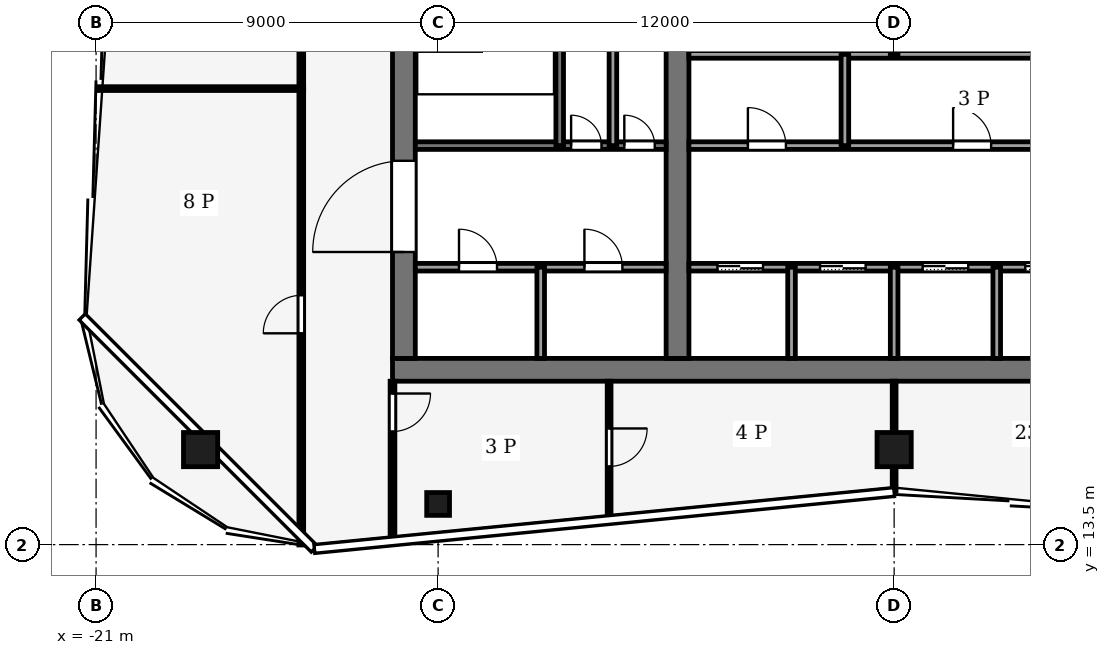
"""IFC4 building model, lengths in metres.
Left out: names, types, materials, properties, quantities, classifications, styles, units other than length and angle.
Written with IfcOpenShell. Run it as: python <this file> out.ifc"""

import sys

from ifc_helpers import new_model, si_unit, direction, frame, frame_2d, origin, origin_2d, place, context, subcontext, project, spatial, rectangle, hollow_rectangle, extrude, element, fill, save


model = new_model("IFC4")
c1 = context("Model", 3, precision=1e-05, world=origin(), true_north=direction((0.0, 1.0)))
c2 = subcontext(c1, "Body", "Model", "MODEL_VIEW")
j1 = project(units=[si_unit("LENGTHUNIT", "METRE"), si_unit("PLANEANGLEUNIT", "RADIAN")], contexts=[c1])
p1 = place(None, origin())
s1 = spatial("IfcSite", under=j1, at=p1, CompositionType="ELEMENT")
p2 = place(p1, origin())
s2 = spatial("IfcBuilding", under=s1, at=p2, CompositionType="ELEMENT")
p3 = place(p2, frame((0.0, 0.0, 314.0)))
s3 = spatial("IfcBuildingStorey", under=s2, at=p3, CompositionType="ELEMENT", Elevation=314.0)
p4 = place(p3, frame((-13.2, 18.1, -0.13), z_axis=(0.0, 0.0, 1.0), x_axis=(1.0, 0.0, 0.0)))
e1 = element("IfcWall", 1, at=p4, inside=s3, PredefinedType="SHEAR", context=c2, shape_type="SweptSolid", body=[
    extrude(rectangle(XDim=26.4, YDim=0.6, at=frame_2d((13.2, 0.0))), origin(), (0.0, 0.0, 1.0), 4.0),
])
p5 = place(p3, frame((-12.9, 18.4, -0.13), z_axis=(0.0, 0.0, 1.0), x_axis=(0.0, 1.0, 0.0)))
e2 = element("IfcWall", 2, at=p5, inside=s3, PredefinedType="SHEAR", context=c2, shape_type="SweptSolid", body=[
    extrude(rectangle(XDim=19.2, YDim=0.6, at=frame_2d((9.6, 0.0))), origin(), (0.0, 0.0, 1.0), 4.0),
])
p6 = place(p5, frame((2.8, 0.0, 0.13)))
e3 = element("IfcOpeningElement", 3, at=p6, cuts=e2, PredefinedType="OPENING", context=c2, shape_type="SweptSolid", body=[
    extrude(rectangle(XDim=2.4, YDim=2.4, at=frame_2d((1.2, 1.2))), frame((0.0, 0.31, 0.0), z_axis=(0.0, -1.0, 0.0), x_axis=(1.0, 0.0, 0.0)), (0.0, 0.0, 1.0), 0.62),
])
p7 = place(p5, frame((13.4, 0.0, 0.13)))
e4 = element("IfcOpeningElement", 4, at=p7, cuts=e2, PredefinedType="OPENING", context=c2, shape_type="SweptSolid", body=[
    extrude(rectangle(XDim=1.4, YDim=2.2, at=frame_2d((0.7, 1.1))), frame((0.0, 0.31, 0.0), z_axis=(0.0, -1.0, 0.0), x_axis=(1.0, 0.0, 0.0)), (0.0, 0.0, 1.0), 0.62),
])
p8 = place(p3, frame((-5.7, 18.4, -0.13), z_axis=(0.0, 0.0, 1.0), x_axis=(0.0, 1.0, 0.0)))
e5 = element("IfcWall", 5, at=p8, inside=s3, PredefinedType="SHEAR", context=c2, shape_type="SweptSolid", body=[
    extrude(rectangle(XDim=19.2, YDim=0.6, at=frame_2d((9.6, 0.0))), origin(), (0.0, 0.0, 1.0), 4.0),
])
p9 = place(p8, frame((8.35, 0.0, 0.13)))
e6 = element("IfcOpeningElement", 6, at=p9, cuts=e5, PredefinedType="OPENING", context=c2, shape_type="SweptSolid", body=[
    extrude(rectangle(XDim=0.9, YDim=2.1, at=frame_2d((0.45, 1.05))), frame((0.0, 0.31, 0.0), z_axis=(0.0, -1.0, 0.0), x_axis=(1.0, 0.0, 0.0)), (0.0, 0.0, 1.0), 0.62),
])
for number, where, z_axis, x_axis in (
    (7, (0.0, 16.0, 0.0), (0.0, 0.0, 1.0), (1.0, 0.0, 0.0)),
    (8, (-18.25, 16.0, 0.0), (0.0, 0.0, 1.0), (1.0, 0.0, 0.0)),
):
    element("IfcColumn", number, at=place(p3, frame(where, z_axis=z_axis, x_axis=x_axis)), inside=s3, PredefinedType="COLUMN", context=c2, shape_type="SweptSolid", body=[
        extrude(hollow_rectangle(XDim=0.9, YDim=0.9, WallThickness=0.04, at=origin_2d()), origin(), (0.0, 0.0, 1.0), 4.0),
    ])
p10 = place(p3, frame((-12.0, 14.57, 0.0), z_axis=(0.0, 0.0, 1.0), x_axis=(1.0, 0.0, 0.0)))
e9 = element("IfcColumn", 9, at=p10, inside=s3, PredefinedType="COLUMN", context=c2, shape_type="SweptSolid", body=[
    extrude(hollow_rectangle(XDim=0.6, YDim=0.6, WallThickness=0.025, at=origin_2d()), origin(), (0.0, 0.0, 1.0), 4.0),
])
p11 = place(p3, frame((-12.6, 20.8, 0.0), z_axis=(0.0, 0.0, 1.0), x_axis=(1.0, 0.0, 0.0)))
e10 = element("IfcWall", 10, at=p11, inside=s3, PredefinedType="PARTITIONING", context=c2, shape_type="SweptSolid", body=[
    extrude(rectangle(XDim=6.6, YDim=0.2, at=frame_2d((3.3, 0.0))), origin(), (0.0, 0.0, 1.0), 3.87),
])
p12 = place(p11, frame((1.15, 0.0, 0.0)))
e11 = element("IfcOpeningElement", 11, at=p12, cuts=e10, PredefinedType="OPENING", context=c2, shape_type="SweptSolid", body=[
    extrude(rectangle(XDim=1.0, YDim=2.1, at=frame_2d((0.5, 1.05))), frame((0.0, 0.11, 0.0), z_axis=(0.0, -1.0, 0.0), x_axis=(1.0, 0.0, 0.0)), (0.0, 0.0, 1.0), 0.22),
])
p13 = place(p11, frame((4.45, 0.0, 0.0)))
e12 = element("IfcOpeningElement", 12, at=p13, cuts=e10, PredefinedType="OPENING", context=c2, shape_type="SweptSolid", body=[
    extrude(rectangle(XDim=1.0, YDim=2.1, at=frame_2d((0.5, 1.05))), frame((0.0, 0.11, 0.0), z_axis=(0.0, -1.0, 0.0), x_axis=(1.0, 0.0, 0.0)), (0.0, 0.0, 1.0), 0.22),
])
p14 = place(p3, frame((-5.4, 20.8, 0.0), z_axis=(0.0, 0.0, 1.0), x_axis=(1.0, 0.0, 0.0)))
e13 = element("IfcWall", 13, at=p14, inside=s3, PredefinedType="PARTITIONING", context=c2, shape_type="SweptSolid", body=[
    extrude(rectangle(XDim=10.8, YDim=0.2, at=frame_2d((5.4, 0.0))), origin(), (0.0, 0.0, 1.0), 3.87),
])
p15 = place(p14, frame((0.75, 0.0, 0.0)))
e14 = element("IfcOpeningElement", 14, at=p15, cuts=e13, PredefinedType="OPENING", context=c2, shape_type="SweptSolid", body=[
    extrude(rectangle(XDim=1.2, YDim=2.2, at=frame_2d((0.6, 1.1))), frame((0.0, 0.11, 0.0), z_axis=(0.0, -1.0, 0.0), x_axis=(1.0, 0.0, 0.0)), (0.0, 0.0, 1.0), 0.22),
])
p16 = place(p14, frame((3.45, 0.0, 0.0)))
e15 = element("IfcOpeningElement", 15, at=p16, cuts=e13, PredefinedType="OPENING", context=c2, shape_type="SweptSolid", body=[
    extrude(rectangle(XDim=1.2, YDim=2.2, at=frame_2d((0.6, 1.1))), frame((0.0, 0.11, 0.0), z_axis=(0.0, -1.0, 0.0), x_axis=(1.0, 0.0, 0.0)), (0.0, 0.0, 1.0), 0.22),
])
p17 = place(p14, frame((6.15, 0.0, 0.0)))
e16 = element("IfcOpeningElement", 16, at=p17, cuts=e13, PredefinedType="OPENING", context=c2, shape_type="SweptSolid", body=[
    extrude(rectangle(XDim=1.2, YDim=2.2, at=frame_2d((0.6, 1.1))), frame((0.0, 0.11, 0.0), z_axis=(0.0, -1.0, 0.0), x_axis=(1.0, 0.0, 0.0)), (0.0, 0.0, 1.0), 0.22),
])
p18 = place(p14, frame((8.85, 0.0, 0.0)))
e17 = element("IfcOpeningElement", 17, at=p18, cuts=e13, PredefinedType="OPENING", context=c2, shape_type="SweptSolid", body=[
    extrude(rectangle(XDim=1.2, YDim=2.2, at=frame_2d((0.6, 1.1))), frame((0.0, 0.11, 0.0), z_axis=(0.0, -1.0, 0.0), x_axis=(1.0, 0.0, 0.0)), (0.0, 0.0, 1.0), 0.22),
])
p19 = place(p3, frame((-12.6, 24.0, 0.0), z_axis=(0.0, 0.0, 1.0), x_axis=(1.0, 0.0, 0.0)))
e18 = element("IfcWall", 18, at=p19, inside=s3, PredefinedType="PARTITIONING", context=c2, shape_type="SweptSolid", body=[
    extrude(rectangle(XDim=6.6, YDim=0.2, at=frame_2d((3.3, 0.0))), origin(), (0.0, 0.0, 1.0), 3.87),
])
p20 = place(p19, frame((4.1, 0.0, 0.0)))
e19 = element("IfcOpeningElement", 19, at=p20, cuts=e18, PredefinedType="OPENING", context=c2, shape_type="SweptSolid", body=[
    extrude(rectangle(XDim=0.8, YDim=2.1, at=frame_2d((0.4, 1.05))), frame((0.0, 0.11, 0.0), z_axis=(0.0, -1.0, 0.0), x_axis=(1.0, 0.0, 0.0)), (0.0, 0.0, 1.0), 0.22),
])
p21 = place(p19, frame((5.5, 0.0, 0.0)))
e20 = element("IfcOpeningElement", 20, at=p21, cuts=e18, PredefinedType="OPENING", context=c2, shape_type="SweptSolid", body=[
    extrude(rectangle(XDim=0.8, YDim=2.1, at=frame_2d((0.4, 1.05))), frame((0.0, 0.11, 0.0), z_axis=(0.0, -1.0, 0.0), x_axis=(1.0, 0.0, 0.0)), (0.0, 0.0, 1.0), 0.22),
])
p22 = place(p3, frame((-5.4, 24.0, 0.0), z_axis=(0.0, 0.0, 1.0), x_axis=(1.0, 0.0, 0.0)))
e21 = element("IfcWall", 21, at=p22, inside=s3, PredefinedType="PARTITIONING", context=c2, shape_type="SweptSolid", body=[
    extrude(rectangle(XDim=10.8, YDim=0.2, at=frame_2d((5.4, 0.0))), origin(), (0.0, 0.0, 1.0), 3.87),
])
p23 = place(p22, frame((1.552, 0.0, 0.0)))
e22 = element("IfcOpeningElement", 22, at=p23, cuts=e21, PredefinedType="OPENING", context=c2, shape_type="SweptSolid", body=[
    extrude(rectangle(XDim=1.0, YDim=2.1, at=frame_2d((0.5, 1.05))), frame((0.0, 0.11, 0.0), z_axis=(0.0, -1.0, 0.0), x_axis=(1.0, 0.0, 0.0)), (0.0, 0.0, 1.0), 0.22),
])
p24 = place(p22, frame((6.952, 0.0, 0.0)))
e23 = element("IfcOpeningElement", 23, at=p24, cuts=e21, PredefinedType="OPENING", context=c2, shape_type="SweptSolid", body=[
    extrude(rectangle(XDim=1.0, YDim=2.1, at=frame_2d((0.5, 1.05))), frame((0.0, 0.11, 0.0), z_axis=(0.0, -1.0, 0.0), x_axis=(1.0, 0.0, 0.0)), (0.0, 0.0, 1.0), 0.22),
])
p25 = place(p3, frame((-5.4, 26.4, 0.0), z_axis=(0.0, 0.0, 1.0), x_axis=(1.0, 0.0, 0.0)))
e24 = element("IfcWall", 24, at=p25, inside=s3, PredefinedType="PARTITIONING", context=c2, shape_type="SweptSolid", body=[
    extrude(rectangle(XDim=10.8, YDim=0.2, at=frame_2d((5.4, 0.0))), origin(), (0.0, 0.0, 1.0), 3.87),
])
p26 = place(p3, frame((-9.3, 18.4, 0.0), z_axis=(0.0, 0.0, 1.0), x_axis=(0.0, 1.0, 0.0)))
e25 = element("IfcWall", 25, at=p26, inside=s3, PredefinedType="PARTITIONING", context=c2, shape_type="SweptSolid", body=[
    extrude(rectangle(XDim=2.4, YDim=0.2, at=frame_2d((1.2, 0.0))), origin(), (0.0, 0.0, 1.0), 3.87),
])
for number, where, z_axis, x_axis in (
    (26, (-8.8, 24.0, 0.0), (0.0, 0.0, 1.0), (0.0, 1.0, 0.0)),
    (27, (-7.4, 24.0, 0.0), (0.0, 0.0, 1.0), (0.0, 1.0, 0.0)),
):
    element("IfcWall", number, at=place(p3, frame(where, z_axis=z_axis, x_axis=x_axis)), inside=s3, PredefinedType="PARTITIONING", context=c2, shape_type="SweptSolid", body=[
        extrude(rectangle(XDim=7.4, YDim=0.2, at=frame_2d((3.7, 0.0))), origin(), (0.0, 0.0, 1.0), 3.87),
    ])
p27 = place(p3, frame((-2.7, 18.4, 0.0), z_axis=(0.0, 0.0, 1.0), x_axis=(0.0, 1.0, 0.0)))
e28 = element("IfcWall", 28, at=p27, inside=s3, PredefinedType="PARTITIONING", context=c2, shape_type="SweptSolid", body=[
    extrude(rectangle(XDim=2.4, YDim=0.2, at=frame_2d((1.2, 0.0))), origin(), (0.0, 0.0, 1.0), 3.87),
])
p28 = place(p3, frame((-1.296, 24.0, 0.0), z_axis=(0.0, 0.0, 1.0), x_axis=(0.0, 1.0, 0.0)))
e29 = element("IfcWall", 29, at=p28, inside=s3, PredefinedType="PARTITIONING", context=c2, shape_type="SweptSolid", body=[
    extrude(rectangle(XDim=2.4, YDim=0.2, at=frame_2d((1.2, 0.0))), origin(), (0.0, 0.0, 1.0), 3.87),
])
p29 = place(p3, frame((0.0, 18.4, 0.0), z_axis=(0.0, 0.0, 1.0), x_axis=(0.0, 1.0, 0.0)))
e30 = element("IfcWall", 30, at=p29, inside=s3, PredefinedType="PARTITIONING", context=c2, shape_type="SweptSolid", body=[
    extrude(rectangle(XDim=2.4, YDim=0.2, at=frame_2d((1.2, 0.0))), origin(), (0.0, 0.0, 1.0), 3.87),
])
p30 = place(p3, frame((0.0, 26.4, 0.0), z_axis=(0.0, 0.0, 1.0), x_axis=(0.0, 1.0, 0.0)))
e31 = element("IfcWall", 31, at=p30, inside=s3, PredefinedType="PARTITIONING", context=c2, shape_type="SweptSolid", body=[
    extrude(rectangle(XDim=1.6, YDim=0.2, at=frame_2d((0.8, 0.0))), origin(), (0.0, 0.0, 1.0), 3.87),
])
p31 = place(p3, frame((2.7, 18.4, 0.0), z_axis=(0.0, 0.0, 1.0), x_axis=(0.0, 1.0, 0.0)))
e32 = element("IfcWall", 32, at=p31, inside=s3, PredefinedType="PARTITIONING", context=c2, shape_type="SweptSolid", body=[
    extrude(rectangle(XDim=2.4, YDim=0.2, at=frame_2d((1.2, 0.0))), origin(), (0.0, 0.0, 1.0), 3.87),
])
p32 = place(p3, frame((-15.6, 13.49, 0.0), z_axis=(0.0, 0.0, 1.0), x_axis=(0.0, 1.0, 0.0)))
e33 = element("IfcWall", 33, at=p32, inside=s3, PredefinedType="PARTITIONING", context=c2, shape_type="SweptSolid", body=[
    extrude(rectangle(XDim=12.01, YDim=0.125, at=frame_2d((6.005, 0.0))), origin(), (0.0, 0.0, 1.0), 2.93),
])
p33 = place(p32, frame((5.571, 0.0, 0.0)))
e34 = element("IfcOpeningElement", 34, at=p33, cuts=e33, PredefinedType="OPENING", context=c2, shape_type="SweptSolid", body=[
    extrude(rectangle(XDim=1.0, YDim=2.1, at=frame_2d((0.5, 1.05))), frame((0.0, 0.073, 0.0), z_axis=(0.0, -1.0, 0.0), x_axis=(1.0, 0.0, 0.0)), (0.0, 0.0, 1.0), 0.145),
])
p34 = place(p3, frame((-15.6, 25.5, 0.0), z_axis=(0.0, 0.0, 1.0), x_axis=(0.0, 1.0, 0.0)))
e35 = element("IfcWall", 35, at=p34, inside=s3, PredefinedType="PARTITIONING", context=c2, shape_type="SweptSolid", body=[
    extrude(rectangle(XDim=9.0, YDim=0.125, at=frame_2d((4.5, 0.0))), origin(), (0.0, 0.0, 1.0), 3.54),
])
p35 = place(p34, frame((4.0, 0.0, 0.0)))
e36 = element("IfcOpeningElement", 36, at=p35, cuts=e35, PredefinedType="OPENING", context=c2, shape_type="SweptSolid", body=[
    extrude(rectangle(XDim=1.0, YDim=2.1, at=frame_2d((0.5, 1.05))), frame((0.0, 0.073, 0.0), z_axis=(0.0, -1.0, 0.0), x_axis=(1.0, 0.0, 0.0)), (0.0, 0.0, 1.0), 0.145),
])
p36 = place(p3, frame((-13.2, 17.8, 0.0), z_axis=(0.0, 0.0, 1.0), x_axis=(0.0, -1.0, 0.0)))
e37 = element("IfcWall", 37, at=p36, inside=s3, PredefinedType="PARTITIONING", context=c2, shape_type="SweptSolid", body=[
    extrude(rectangle(XDim=4.178, YDim=0.125, at=frame_2d((2.089, 0.0))), origin(), (0.0, 0.0, 1.0), 3.04),
])
p37 = place(p36, frame((0.324, 0.0, 0.0)))
e38 = element("IfcOpeningElement", 38, at=p37, cuts=e37, PredefinedType="OPENING", context=c2, shape_type="SweptSolid", body=[
    extrude(rectangle(XDim=1.0, YDim=2.1, at=frame_2d((0.5, 1.05))), frame((0.0, 0.073, 0.0), z_axis=(0.0, -1.0, 0.0), x_axis=(1.0, 0.0, 0.0)), (0.0, 0.0, 1.0), 0.145),
])
p38 = place(p3, frame((-15.6, 25.5, 0.0), z_axis=(0.0, 0.0, 1.0), x_axis=(-1.0, 0.0, 0.0)))
e39 = element("IfcWall", 39, at=p38, inside=s3, PredefinedType="PARTITIONING", context=c2, shape_type="SweptSolid", body=[
    extrude(rectangle(XDim=5.316, YDim=0.1, at=frame_2d((2.658, 0.0))), origin(), (0.0, 0.0, 1.0), 3.04),
])
p39 = place(p3, frame((-7.5, 17.8, 0.0), z_axis=(0.0, 0.0, 1.0), x_axis=(0.0, -1.0, 0.0)))
e40 = element("IfcWall", 40, at=p39, inside=s3, PredefinedType="PARTITIONING", context=c2, shape_type="SweptSolid", body=[
    extrude(rectangle(XDim=3.618, YDim=0.1, at=frame_2d((1.809, 0.0))), origin(), (0.0, 0.0, 1.0), 3.04),
])
p40 = place(p39, frame((1.244, 0.0, 0.0)))
e41 = element("IfcOpeningElement", 41, at=p40, cuts=e40, PredefinedType="OPENING", context=c2, shape_type="SweptSolid", body=[
    extrude(rectangle(XDim=1.0, YDim=2.1, at=frame_2d((0.5, 1.05))), frame((0.0, 0.06, 0.0), z_axis=(0.0, -1.0, 0.0), x_axis=(1.0, 0.0, 0.0)), (0.0, 0.0, 1.0), 0.12),
])
p41 = place(p3, frame((0.0, 14.92, 0.0), z_axis=(0.0, 0.0, 1.0), x_axis=(0.0, 1.0, 0.0)))
e42 = element("IfcWall", 42, at=p41, inside=s3, PredefinedType="PARTITIONING", context=c2, shape_type="SweptSolid", body=[
    extrude(rectangle(XDim=2.88, YDim=0.1, at=frame_2d((1.44, 0.0))), origin(), (0.0, 0.0, 1.0), 3.54),
])
p42 = place(p15, origin())
e43 = element("IfcDoor", 43, at=p42, inside=s3, OperationType="SLIDING_TO_LEFT", PredefinedType="DOOR", context=c2, shape_type="SweptSolid", body=[
    extrude(rectangle(XDim=1.2, YDim=2.2, at=frame_2d((0.6, 1.1))), frame((0.0, 0.025, 0.0), z_axis=(0.0, -1.0, 0.0), x_axis=(1.0, 0.0, 0.0)), (0.0, 0.0, 1.0), 0.05),
])
fill(e14, e43)
p43 = place(p16, origin())
e44 = element("IfcDoor", 44, at=p43, inside=s3, OperationType="SLIDING_TO_LEFT", PredefinedType="DOOR", context=c2, shape_type="SweptSolid", body=[
    extrude(rectangle(XDim=1.2, YDim=2.2, at=frame_2d((0.6, 1.1))), frame((0.0, 0.025, 0.0), z_axis=(0.0, -1.0, 0.0), x_axis=(1.0, 0.0, 0.0)), (0.0, 0.0, 1.0), 0.05),
])
fill(e15, e44)
p44 = place(p17, origin())
e45 = element("IfcDoor", 45, at=p44, inside=s3, OperationType="SLIDING_TO_LEFT", PredefinedType="DOOR", context=c2, shape_type="SweptSolid", body=[
    extrude(rectangle(XDim=1.2, YDim=2.2, at=frame_2d((0.6, 1.1))), frame((0.0, 0.025, 0.0), z_axis=(0.0, -1.0, 0.0), x_axis=(1.0, 0.0, 0.0)), (0.0, 0.0, 1.0), 0.05),
])
fill(e16, e45)
p45 = place(p18, origin())
e46 = element("IfcDoor", 46, at=p45, inside=s3, OperationType="SLIDING_TO_LEFT", PredefinedType="DOOR", context=c2, shape_type="SweptSolid", body=[
    extrude(rectangle(XDim=1.2, YDim=2.2, at=frame_2d((0.6, 1.1))), frame((0.0, 0.025, 0.0), z_axis=(0.0, -1.0, 0.0), x_axis=(1.0, 0.0, 0.0)), (0.0, 0.0, 1.0), 0.05),
])
fill(e17, e46)
p46 = place(p23, origin())
e47 = element("IfcDoor", 47, at=p46, inside=s3, OperationType="SINGLE_SWING_LEFT", PredefinedType="DOOR", context=c2, shape_type="SweptSolid", body=[
    extrude(rectangle(XDim=1.0, YDim=2.1, at=frame_2d((0.5, 1.05))), frame((0.0, 0.025, 0.0), z_axis=(0.0, -1.0, 0.0), x_axis=(1.0, 0.0, 0.0)), (0.0, 0.0, 1.0), 0.05),
])
fill(e22, e47)
p47 = place(p24, origin())
e48 = element("IfcDoor", 48, at=p47, inside=s3, OperationType="SINGLE_SWING_RIGHT", PredefinedType="DOOR", context=c2, shape_type="SweptSolid", body=[
    extrude(rectangle(XDim=1.0, YDim=2.1, at=frame_2d((0.5, 1.05))), frame((0.0, 0.025, 0.0), z_axis=(0.0, -1.0, 0.0), x_axis=(1.0, 0.0, 0.0)), (0.0, 0.0, 1.0), 0.05),
])
fill(e23, e48)
p48 = place(p12, origin())
e49 = element("IfcDoor", 49, at=p48, inside=s3, OperationType="SINGLE_SWING_LEFT", PredefinedType="DOOR", context=c2, shape_type="SweptSolid", body=[
    extrude(rectangle(XDim=1.0, YDim=2.1, at=frame_2d((0.5, 1.05))), frame((0.0, 0.025, 0.0), z_axis=(0.0, -1.0, 0.0), x_axis=(1.0, 0.0, 0.0)), (0.0, 0.0, 1.0), 0.05),
])
fill(e11, e49)
p49 = place(p13, origin())
e50 = element("IfcDoor", 50, at=p49, inside=s3, OperationType="SINGLE_SWING_LEFT", PredefinedType="DOOR", context=c2, shape_type="SweptSolid", body=[
    extrude(rectangle(XDim=1.0, YDim=2.1, at=frame_2d((0.5, 1.05))), frame((0.0, 0.025, 0.0), z_axis=(0.0, -1.0, 0.0), x_axis=(1.0, 0.0, 0.0)), (0.0, 0.0, 1.0), 0.05),
])
fill(e12, e50)
p50 = place(p20, origin())
e51 = element("IfcDoor", 51, at=p50, inside=s3, OperationType="SINGLE_SWING_LEFT", PredefinedType="DOOR", context=c2, shape_type="SweptSolid", body=[
    extrude(rectangle(XDim=0.8, YDim=2.1, at=frame_2d((0.4, 1.05))), frame((0.0, 0.025, 0.0), z_axis=(0.0, -1.0, 0.0), x_axis=(1.0, 0.0, 0.0)), (0.0, 0.0, 1.0), 0.05),
])
fill(e19, e51)
p51 = place(p21, origin())
e52 = element("IfcDoor", 52, at=p51, inside=s3, OperationType="SINGLE_SWING_RIGHT", PredefinedType="DOOR", context=c2, shape_type="SweptSolid", body=[
    extrude(rectangle(XDim=0.8, YDim=2.1, at=frame_2d((0.4, 1.05))), frame((0.0, 0.025, 0.0), z_axis=(0.0, -1.0, 0.0), x_axis=(1.0, 0.0, 0.0)), (0.0, 0.0, 1.0), 0.05),
])
fill(e20, e52)
p52 = place(p6, origin())
e53 = element("IfcDoor", 53, at=p52, inside=s3, OperationType="DOUBLE_DOOR_SINGLE_SWING", PredefinedType="DOOR", context=c2, shape_type="SweptSolid", body=[
    extrude(rectangle(XDim=2.4, YDim=2.4, at=frame_2d((1.2, 1.2))), frame((0.0, 0.025, 0.0), z_axis=(0.0, -1.0, 0.0), x_axis=(1.0, 0.0, 0.0)), (0.0, 0.0, 1.0), 0.05),
])
fill(e3, e53)
p53 = place(p33, origin())
e54 = element("IfcDoor", 54, at=p53, inside=s3, OperationType="SINGLE_SWING_RIGHT", PredefinedType="DOOR", context=c2, shape_type="SweptSolid", body=[
    extrude(rectangle(XDim=1.0, YDim=2.1, at=frame_2d((0.5, 1.05))), frame((0.0, 0.025, 0.0), z_axis=(0.0, -1.0, 0.0), x_axis=(1.0, 0.0, 0.0)), (0.0, 0.0, 1.0), 0.05),
])
fill(e34, e54)
p54 = place(p37, origin())
e55 = element("IfcDoor", 55, at=p54, inside=s3, OperationType="SINGLE_SWING_LEFT", PredefinedType="DOOR", context=c2, shape_type="SweptSolid", body=[
    extrude(rectangle(XDim=1.0, YDim=2.1, at=frame_2d((0.5, 1.05))), frame((0.0, 0.025, 0.0), z_axis=(0.0, -1.0, 0.0), x_axis=(1.0, 0.0, 0.0)), (0.0, 0.0, 1.0), 0.05),
])
fill(e38, e55)
p55 = place(p40, origin())
e56 = element("IfcDoor", 56, at=p55, inside=s3, OperationType="SINGLE_SWING_LEFT", PredefinedType="DOOR", context=c2, shape_type="SweptSolid", body=[
    extrude(rectangle(XDim=1.0, YDim=2.1, at=frame_2d((0.5, 1.05))), frame((0.0, 0.025, 0.0), z_axis=(0.0, -1.0, 0.0), x_axis=(1.0, 0.0, 0.0)), (0.0, 0.0, 1.0), 0.05),
])
fill(e41, e56)
save(model, sys.argv[1])
